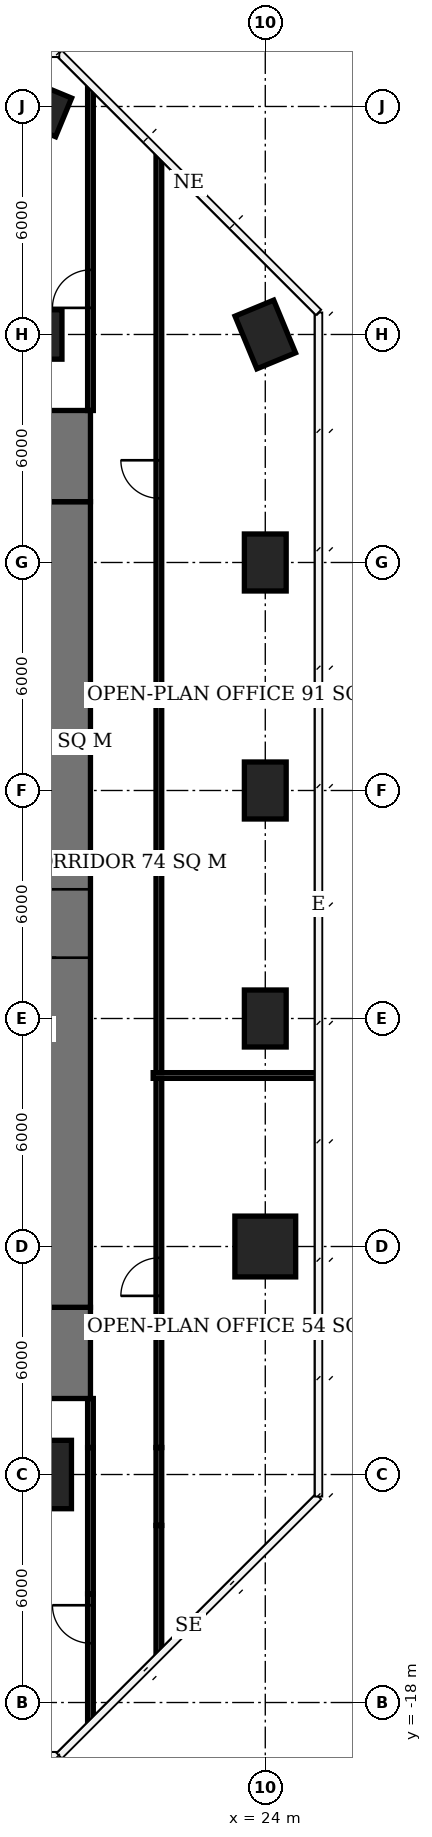
"""IFC4 building model, lengths in metres.
Left out: names, types, materials, properties, quantities, classifications, styles, units other than length and angle.
Written with IfcOpenShell. Run it as: python <this file> out.ifc"""

import sys

from ifc_helpers import new_model, si_unit, direction, frame, frame_2d, origin, origin_2d, place, context, subcontext, project, spatial, rectangle, extrude, element, fill, save


model = new_model("IFC4")
c1 = context("Model", 3, precision=1e-05, world=origin(), true_north=direction((0.0, 1.0)))
c2 = subcontext(c1, "Body", "Model", "MODEL_VIEW")
j1 = project(units=[si_unit("LENGTHUNIT", "METRE"), si_unit("PLANEANGLEUNIT", "RADIAN")], contexts=[c1])
p1 = place(None, origin())
s1 = spatial("IfcSite", under=j1, at=p1, CompositionType="ELEMENT")
p2 = place(p1, origin())
s2 = spatial("IfcBuilding", under=s1, at=p2, CompositionType="ELEMENT")
p3 = place(p2, frame((0.0, 0.0, 224.0)))
s3 = spatial("IfcBuildingStorey", under=s2, at=p3, CompositionType="ELEMENT", Elevation=224.0)
p4 = place(p3, frame((18.0, -12.0, 0.0), z_axis=(0.0, 0.0, 1.0), x_axis=(1.0, 0.0, 0.0)))
e1 = element("IfcColumn", 1, at=p4, inside=s3, PredefinedType="COLUMN", context=c2, shape_type="SweptSolid", body=[
    extrude(rectangle(XDim=1.8, YDim=1.8, at=origin_2d()), origin(), (0.0, 0.0, 1.0), 3.9),
])
p5 = place(p3, frame((18.0, 18.0, 0.0), z_axis=(0.0, 0.0, 1.0), x_axis=(1.0, 0.0, 0.0)))
e2 = element("IfcColumn", 2, at=p5, inside=s3, PredefinedType="COLUMN", context=c2, shape_type="SweptSolid", body=[
    extrude(rectangle(XDim=1.3, YDim=1.3, at=origin_2d()), origin(), (0.0, 0.0, 1.0), 3.9),
])
p6 = place(p3, frame((18.0, 24.0, 0.0), z_axis=(0.0, 0.0, 1.0), x_axis=(0.923879532511, -0.382683432365, 0.0)))
e3 = element("IfcColumn", 3, at=p6, inside=s3, PredefinedType="COLUMN", context=c2, shape_type="SweptSolid", body=[
    extrude(rectangle(XDim=1.5, YDim=1.1, at=origin_2d()), origin(), (0.0, 0.0, 1.0), 3.9),
])
p7 = place(p3, frame((24.0, -6.0, 0.0), z_axis=(0.0, 0.0, 1.0), x_axis=(1.0, 0.0, 0.0)))
e4 = element("IfcColumn", 4, at=p7, inside=s3, PredefinedType="COLUMN", context=c2, shape_type="SweptSolid", body=[
    extrude(rectangle(XDim=1.6, YDim=1.6, at=origin_2d()), origin(), (0.0, 0.0, 1.0), 3.9),
])
for number, where, z_axis, x_axis in (
    (5, (24.0, 0.0, 0.0), (0.0, 0.0, 1.0), (0.0, 1.0, 0.0)),
    (6, (24.0, 6.0, 0.0), (0.0, 0.0, 1.0), (0.0, 1.0, 0.0)),
    (7, (24.0, 12.0, 0.0), (0.0, 0.0, 1.0), (0.0, 1.0, 0.0)),
    (8, (24.0, 18.0, 0.0), (0.0, 0.0, 1.0), (0.383, -0.924, 0.0)),
):
    element("IfcColumn", number, at=place(p3, frame(where, z_axis=z_axis, x_axis=x_axis)), inside=s3, PredefinedType="COLUMN", context=c2, shape_type="SweptSolid", body=[
        extrude(rectangle(XDim=1.5, YDim=1.1, at=origin_2d()), origin(), (0.0, 0.0, 1.0), 3.9),
    ])
p8 = place(p3, frame((18.5, -7.6, 0.0), z_axis=(0.0, 0.0, 1.0), x_axis=(0.0, 1.0, 0.0)))
e9 = element("IfcWall", 9, at=p8, inside=s3, PredefinedType="SHEAR", context=c2, shape_type="SweptSolid", body=[
    extrude(rectangle(XDim=21.2, YDim=1.8, at=frame_2d((10.6, 0.0))), origin(), (0.0, 0.0, 1.0), 3.9),
])
p9 = place(p8, frame((9.2, 0.0, 0.0)))
e10 = element("IfcOpeningElement", 10, at=p9, cuts=e9, PredefinedType="OPENING", context=c2, shape_type="SweptSolid", body=[
    extrude(rectangle(XDim=1.8, YDim=2.4, at=frame_2d((0.9, 1.2))), frame((0.0, 0.91, 0.0), z_axis=(0.0, -1.0, 0.0), x_axis=(1.0, 0.0, 0.0)), (0.0, 0.0, 1.0), 1.82),
])
for number, where, z_axis, x_axis in (
    (11, (18.5, -10.0, 0.0), (0.0, 0.0, 1.0), (0.0, 1.0, 0.0)),
    (12, (18.5, 13.6, 0.0), (0.0, 0.0, 1.0), (0.0, 1.0, 0.0)),
):
    element("IfcWall", number, at=place(p3, frame(where, z_axis=z_axis, x_axis=x_axis)), inside=s3, PredefinedType="SHEAR", context=c2, shape_type="SweptSolid", body=[
        extrude(rectangle(XDim=2.4, YDim=1.8, at=frame_2d((1.2, 0.0))), origin(), (0.0, 0.0, 1.0), 3.9),
    ])
p10 = place(p3, frame((19.4, -18.489, 0.0), z_axis=(0.0, 0.0, 1.0), x_axis=(0.0, 1.0, 0.0)))
e13 = element("IfcWall", 13, at=p10, inside=s3, PredefinedType="PARTITIONING", context=c2, shape_type="SweptSolid", body=[
    extrude(rectangle(XDim=3.349, YDim=0.15, at=frame_2d((1.675, 0.0))), origin(), (0.0, 0.0, 1.0), 3.65),
])
p11 = place(p10, frame((2.049, 0.0, 0.0)))
e14 = element("IfcOpeningElement", 14, at=p11, cuts=e13, PredefinedType="OPENING", context=c2, shape_type="SweptSolid", body=[
    extrude(rectangle(XDim=1.0, YDim=2.1, at=frame_2d((0.5, 1.05))), frame((0.0, 0.085, 0.0), z_axis=(0.0, -1.0, 0.0), x_axis=(1.0, 0.0, 0.0)), (0.0, 0.0, 1.0), 0.17),
])
p12 = place(p3, frame((19.4, -15.14, 0.0), z_axis=(0.0, 0.0, 1.0), x_axis=(0.0, 1.0, 0.0)))
e15 = element("IfcWall", 15, at=p12, inside=s3, PredefinedType="PARTITIONING", context=c2, shape_type="SweptSolid", body=[
    extrude(rectangle(XDim=3.85, YDim=0.15, at=frame_2d((1.925, 0.0))), origin(), (0.0, 0.0, 1.0), 2.65),
])
p13 = place(p3, frame((19.4, -11.29, 0.0), z_axis=(0.0, 0.0, 1.0), x_axis=(0.0, 1.0, 0.0)))
e16 = element("IfcWall", 16, at=p13, inside=s3, PredefinedType="PARTITIONING", context=c2, shape_type="SweptSolid", body=[
    extrude(rectangle(XDim=1.29, YDim=0.15, at=frame_2d((0.645, 0.0))), origin(), (0.0, 0.0, 1.0), 3.65),
])
p14 = place(p3, frame((19.4, 16.0, 0.0), z_axis=(0.0, 0.0, 1.0), x_axis=(0.0, 1.0, 0.0)))
e17 = element("IfcWall", 17, at=p14, inside=s3, PredefinedType="PARTITIONING", context=c2, shape_type="SweptSolid", body=[
    extrude(rectangle(XDim=8.489, YDim=0.15, at=frame_2d((4.245, 0.0))), origin(), (0.0, 0.0, 1.0), 3.65),
])
p15 = place(p14, frame((2.7, 0.0, 0.0)))
e18 = element("IfcOpeningElement", 18, at=p15, cuts=e17, PredefinedType="OPENING", context=c2, shape_type="SweptSolid", body=[
    extrude(rectangle(XDim=1.0, YDim=2.1, at=frame_2d((0.5, 1.05))), frame((0.0, 0.085, 0.0), z_axis=(0.0, -1.0, 0.0), x_axis=(1.0, 0.0, 0.0)), (0.0, 0.0, 1.0), 0.17),
])
p16 = place(p3, frame((21.2, -16.689, 0.0), z_axis=(0.0, 0.0, 1.0), x_axis=(0.0, 1.0, 0.0)))
e19 = element("IfcWall", 19, at=p16, inside=s3, PredefinedType="PARTITIONING", context=c2, shape_type="SweptSolid", body=[
    extrude(rectangle(XDim=3.349, YDim=0.15, at=frame_2d((1.674, 0.0))), origin(), (0.0, 0.0, 1.0), 3.65),
])
p17 = place(p3, frame((21.2, -13.34, 0.0), z_axis=(0.0, 0.0, 1.0), x_axis=(0.0, 1.0, 0.0)))
e20 = element("IfcWall", 20, at=p17, inside=s3, PredefinedType="PARTITIONING", context=c2, shape_type="SweptSolid", body=[
    extrude(rectangle(XDim=2.05, YDim=0.15, at=frame_2d((1.025, 0.0))), origin(), (0.0, 0.0, 1.0), 2.65),
])
p18 = place(p3, frame((21.2, -11.29, 0.0), z_axis=(0.0, 0.0, 1.0), x_axis=(0.0, 1.0, 0.0)))
e21 = element("IfcWall", 21, at=p18, inside=s3, PredefinedType="PARTITIONING", context=c2, shape_type="SweptSolid", body=[
    extrude(rectangle(XDim=9.715, YDim=0.15, at=frame_2d((4.857, 0.0))), origin(), (0.0, 0.0, 1.0), 3.65),
])
p19 = place(p18, frame((3.991, 0.0, 0.0)))
e22 = element("IfcOpeningElement", 22, at=p19, cuts=e21, PredefinedType="OPENING", context=c2, shape_type="SweptSolid", body=[
    extrude(rectangle(XDim=1.0, YDim=2.1, at=frame_2d((0.5, 1.05))), frame((0.0, 0.085, 0.0), z_axis=(0.0, -1.0, 0.0), x_axis=(1.0, 0.0, 0.0)), (0.0, 0.0, 1.0), 0.17),
])
p20 = place(p3, frame((21.2, -1.425, 0.0), z_axis=(0.0, 0.0, 1.0), x_axis=(0.0, 1.0, 0.0)))
e23 = element("IfcWall", 23, at=p20, inside=s3, PredefinedType="PARTITIONING", context=c2, shape_type="SweptSolid", body=[
    extrude(rectangle(XDim=24.114, YDim=0.15, at=frame_2d((12.057, 0.0))), origin(), (0.0, 0.0, 1.0), 3.65),
])
p21 = place(p20, frame((15.115, 0.0, 0.0)))
e24 = element("IfcOpeningElement", 24, at=p21, cuts=e23, PredefinedType="OPENING", context=c2, shape_type="SweptSolid", body=[
    extrude(rectangle(XDim=1.0, YDim=2.1, at=frame_2d((0.5, 1.05))), frame((0.0, 0.085, 0.0), z_axis=(0.0, -1.0, 0.0), x_axis=(1.0, 0.0, 0.0)), (0.0, 0.0, 1.0), 0.17),
])
p22 = place(p3, frame((21.05, -1.5, 0.0), z_axis=(0.0, 0.0, 1.0), x_axis=(1.0, 0.0, 0.0)))
e25 = element("IfcWall", 25, at=p22, inside=s3, PredefinedType="PARTITIONING", context=c2, shape_type="SweptSolid", body=[
    extrude(rectangle(XDim=4.35, YDim=0.15, at=frame_2d((2.175, 0.0))), origin(), (0.0, 0.0, 1.0), 3.65),
])
p23 = place(p9, origin())
e26 = element("IfcDoor", 26, at=p23, inside=s3, OperationType="DOUBLE_DOOR_SINGLE_SWING", PredefinedType="DOOR", context=c2, shape_type="SweptSolid", body=[
    extrude(rectangle(XDim=1.8, YDim=2.4, at=frame_2d((0.9, 1.2))), frame((0.0, 0.025, 0.0), z_axis=(0.0, -1.0, 0.0), x_axis=(1.0, 0.0, 0.0)), (0.0, 0.0, 1.0), 0.05),
])
fill(e10, e26)
p24 = place(p11, origin())
e27 = element("IfcDoor", 27, at=p24, inside=s3, OperationType="SINGLE_SWING_RIGHT", PredefinedType="DOOR", context=c2, shape_type="SweptSolid", body=[
    extrude(rectangle(XDim=1.0, YDim=2.1, at=frame_2d((0.5, 1.05))), frame((0.0, 0.025, 0.0), z_axis=(0.0, -1.0, 0.0), x_axis=(1.0, 0.0, 0.0)), (0.0, 0.0, 1.0), 0.05),
])
fill(e14, e27)
p25 = place(p19, origin())
e28 = element("IfcDoor", 28, at=p25, inside=s3, OperationType="SINGLE_SWING_LEFT", PredefinedType="DOOR", context=c2, shape_type="SweptSolid", body=[
    extrude(rectangle(XDim=1.0, YDim=2.1, at=frame_2d((0.5, 1.05))), frame((0.0, 0.025, 0.0), z_axis=(0.0, -1.0, 0.0), x_axis=(1.0, 0.0, 0.0)), (0.0, 0.0, 1.0), 0.05),
])
fill(e22, e28)
p26 = place(p21, origin())
e29 = element("IfcDoor", 29, at=p26, inside=s3, OperationType="SINGLE_SWING_RIGHT", PredefinedType="DOOR", context=c2, shape_type="SweptSolid", body=[
    extrude(rectangle(XDim=1.0, YDim=2.1, at=frame_2d((0.5, 1.05))), frame((0.0, 0.025, 0.0), z_axis=(0.0, -1.0, 0.0), x_axis=(1.0, 0.0, 0.0)), (0.0, 0.0, 1.0), 0.05),
])
fill(e24, e29)
p27 = place(p15, origin())
e30 = element("IfcDoor", 30, at=p27, inside=s3, OperationType="SINGLE_SWING_LEFT", PredefinedType="DOOR", context=c2, shape_type="SweptSolid", body=[
    extrude(rectangle(XDim=1.0, YDim=2.1, at=frame_2d((0.5, 1.05))), frame((0.0, 0.025, 0.0), z_axis=(0.0, -1.0, 0.0), x_axis=(1.0, 0.0, 0.0)), (0.0, 0.0, 1.0), 0.05),
])
fill(e18, e30)
save(model, sys.argv[1])
